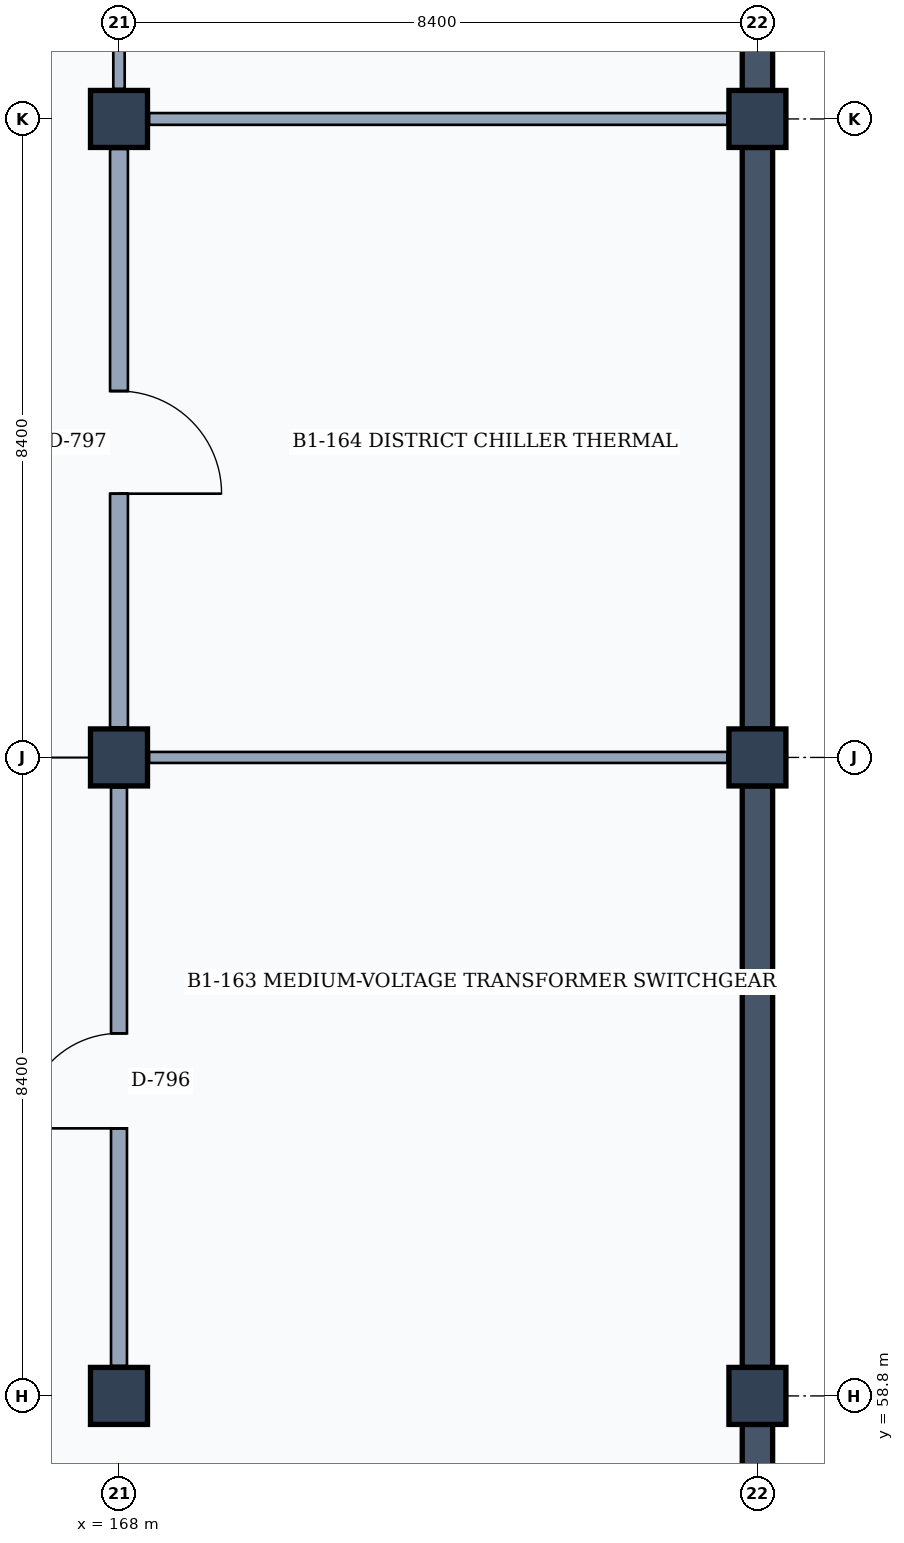
"""IFC4 building model, lengths in metres.
Left out: names, types, materials, properties, quantities, classifications, styles, units other than length and angle.
Written with IfcOpenShell. Run it as: python <this file> out.ifc"""

import sys

from ifc_helpers import new_model, si_unit, direction, frame, frame_2d, origin, origin_2d, place, context, subcontext, project, spatial, rectangle, extrude, element, fill, save


model = new_model("IFC4")
c1 = context("Model", 3, precision=1e-05, world=origin(), true_north=direction((0.0, 1.0)))
c2 = subcontext(c1, "Body", "Model", "MODEL_VIEW")
j1 = project(units=[si_unit("LENGTHUNIT", "METRE"), si_unit("PLANEANGLEUNIT", "RADIAN")], contexts=[c1])
p1 = place(None, origin())
s1 = spatial("IfcSite", under=j1, at=p1, CompositionType="ELEMENT")
p2 = place(p1, origin())
s2 = spatial("IfcBuilding", under=s1, at=p2, CompositionType="ELEMENT")
p3 = place(p2, frame((0.0, 0.0, -4.2)))
s3 = spatial("IfcBuildingStorey", under=s2, at=p3, CompositionType="ELEMENT", Elevation=-4.2)
for number, where, z_axis, x_axis in (
    (1, (168.0, 58.8, 0.0), (0.0, 0.0, 1.0), (1.0, 0.0, 0.0)),
    (2, (168.0, 67.2, 0.0), (0.0, 0.0, 1.0), (1.0, 0.0, 0.0)),
    (3, (168.0, 75.6, 0.0), (0.0, 0.0, 1.0), (1.0, 0.0, 0.0)),
    (4, (176.4, 58.8, 0.0), (0.0, 0.0, 1.0), (1.0, 0.0, 0.0)),
    (5, (176.4, 67.2, 0.0), (0.0, 0.0, 1.0), (1.0, 0.0, 0.0)),
    (6, (176.4, 75.6, 0.0), (0.0, 0.0, 1.0), (1.0, 0.0, 0.0)),
):
    element("IfcColumn", number, at=place(p3, frame(where, z_axis=z_axis, x_axis=x_axis)), inside=s3, PredefinedType="COLUMN", context=c2, shape_type="SweptSolid", body=[
        extrude(rectangle(XDim=0.75, YDim=0.75, at=origin_2d()), origin(), (0.0, 0.0, 1.0), 4.2),
    ])
p4 = place(p3, frame((176.4, 58.425, 0.0), z_axis=(0.0, 0.0, 1.0), x_axis=(0.0, -1.0, 0.0)))
e7 = element("IfcWall", 7, at=p4, inside=s3, PredefinedType="STANDARD", context=c2, shape_type="SweptSolid", body=[
    extrude(rectangle(XDim=7.7, YDim=0.4, at=frame_2d((3.85, 0.0))), origin(), (0.0, 0.0, 1.0), 3.88),
])
p5 = place(p3, frame((176.4, 66.825, 0.0), z_axis=(0.0, 0.0, 1.0), x_axis=(0.0, -1.0, 0.0)))
e8 = element("IfcWall", 8, at=p5, inside=s3, PredefinedType="STANDARD", context=c2, shape_type="SweptSolid", body=[
    extrude(rectangle(XDim=7.65, YDim=0.4, at=frame_2d((3.825, 0.0))), origin(), (0.0, 0.0, 1.0), 3.88),
])
p6 = place(p3, frame((176.4, 75.225, 0.0), z_axis=(0.0, 0.0, 1.0), x_axis=(0.0, -1.0, 0.0)))
e9 = element("IfcWall", 9, at=p6, inside=s3, PredefinedType="STANDARD", context=c2, shape_type="SweptSolid", body=[
    extrude(rectangle(XDim=7.65, YDim=0.4, at=frame_2d((3.825, 0.0))), origin(), (0.0, 0.0, 1.0), 3.88),
])
p7 = place(p3, frame((176.4, 83.625, 0.0), z_axis=(0.0, 0.0, 1.0), x_axis=(0.0, -1.0, 0.0)))
e10 = element("IfcWall", 10, at=p7, inside=s3, PredefinedType="STANDARD", context=c2, shape_type="SweptSolid", body=[
    extrude(rectangle(XDim=7.65, YDim=0.4, at=frame_2d((3.825, 0.0))), origin(), (0.0, 0.0, 1.0), 3.88),
])
p8 = place(p3, frame((168.0, 59.195, 0.0), z_axis=(0.0, 0.0, 1.0), x_axis=(0.0, 1.0, 0.0)))
e11 = element("IfcWall", 11, at=p8, inside=s3, PredefinedType="PARTITIONING", context=c2, shape_type="SweptSolid", body=[
    extrude(rectangle(XDim=7.61, YDim=0.21, at=frame_2d((3.805, 0.0))), origin(), (0.0, 0.0, 1.0), 3.1),
])
p9 = place(p8, frame((3.125, 0.0, 0.0)))
e12 = element("IfcOpeningElement", 12, at=p9, cuts=e11, PredefinedType="OPENING", context=c2, shape_type="SweptSolid", body=[
    extrude(rectangle(XDim=1.25, YDim=2.3, at=frame_2d((0.625, 1.15))), frame((0.0, 0.115, 0.0), z_axis=(0.0, -1.0, 0.0), x_axis=(1.0, 0.0, 0.0)), (0.0, 0.0, 1.0), 0.23),
])
p10 = place(p3, frame((168.0, 67.595, 0.0), z_axis=(0.0, 0.0, 1.0), x_axis=(0.0, 1.0, 0.0)))
e13 = element("IfcWall", 13, at=p10, inside=s3, PredefinedType="PARTITIONING", context=c2, shape_type="SweptSolid", body=[
    extrude(rectangle(XDim=7.61, YDim=0.235, at=frame_2d((3.805, 0.0))), origin(), (0.0, 0.0, 1.0), 3.1),
])
p11 = place(p10, frame((3.075, 0.0, 0.0)))
e14 = element("IfcOpeningElement", 14, at=p11, cuts=e13, PredefinedType="OPENING", context=c2, shape_type="SweptSolid", body=[
    extrude(rectangle(XDim=1.35, YDim=2.25, at=frame_2d((0.675, 1.125))), frame((0.0, 0.127, 0.0), z_axis=(0.0, -1.0, 0.0), x_axis=(1.0, 0.0, 0.0)), (0.0, 0.0, 1.0), 0.255),
])
p12 = place(p3, frame((168.0, 75.995, 0.0), z_axis=(0.0, 0.0, 1.0), x_axis=(0.0, 1.0, 0.0)))
e15 = element("IfcWall", 15, at=p12, inside=s3, PredefinedType="PARTITIONING", context=c2, shape_type="SweptSolid", body=[
    extrude(rectangle(XDim=7.61, YDim=0.15, at=frame_2d((3.805, 0.0))), origin(), (0.0, 0.0, 1.0), 3.1),
])
p13 = place(p12, frame((3.025, 0.0, 0.0)))
e16 = element("IfcOpeningElement", 16, at=p13, cuts=e15, PredefinedType="OPENING", context=c2, shape_type="SweptSolid", body=[
    extrude(rectangle(XDim=1.45, YDim=2.35, at=frame_2d((0.725, 1.175))), frame((0.0, 0.085, 0.0), z_axis=(0.0, -1.0, 0.0), x_axis=(1.0, 0.0, 0.0)), (0.0, 0.0, 1.0), 0.17),
])
p14 = place(p3, frame((168.395, 67.2, 0.0), z_axis=(0.0, 0.0, 1.0), x_axis=(1.0, 0.0, 0.0)))
e17 = element("IfcWall", 17, at=p14, inside=s3, PredefinedType="PARTITIONING", context=c2, shape_type="SweptSolid", body=[
    extrude(rectangle(XDim=7.61, YDim=0.145, at=frame_2d((3.805, 0.0))), origin(), (0.0, 0.0, 1.0), 3.05),
])
p15 = place(p3, frame((168.395, 75.6, 0.0), z_axis=(0.0, 0.0, 1.0), x_axis=(1.0, 0.0, 0.0)))
e18 = element("IfcWall", 18, at=p15, inside=s3, PredefinedType="PARTITIONING", context=c2, shape_type="SweptSolid", body=[
    extrude(rectangle(XDim=7.61, YDim=0.155, at=frame_2d((3.805, 0.0))), origin(), (0.0, 0.0, 1.0), 3.05),
])
p16 = place(p9, origin())
e19 = element("IfcDoor", 19, at=p16, inside=s3, OperationType="SINGLE_SWING_LEFT", PredefinedType="DOOR", context=c2, shape_type="SweptSolid", body=[
    extrude(rectangle(XDim=1.25, YDim=2.3, at=frame_2d((0.625, 1.15))), frame((0.0, 0.025, 0.0), z_axis=(0.0, -1.0, 0.0), x_axis=(1.0, 0.0, 0.0)), (0.0, 0.0, 1.0), 0.05),
])
fill(e12, e19)
p17 = place(p11, frame((1.35, 0.0, 0.0), z_axis=(0.0, 0.0, 1.0), x_axis=(-1.0, 0.0, 0.0)))
e20 = element("IfcDoor", 20, at=p17, inside=s3, OperationType="SINGLE_SWING_RIGHT", PredefinedType="DOOR", context=c2, shape_type="SweptSolid", body=[
    extrude(rectangle(XDim=1.35, YDim=2.25, at=frame_2d((0.675, 1.125))), frame((0.0, 0.025, 0.0), z_axis=(0.0, -1.0, 0.0), x_axis=(1.0, 0.0, 0.0)), (0.0, 0.0, 1.0), 0.05),
])
fill(e14, e20)
save(model, sys.argv[1])
